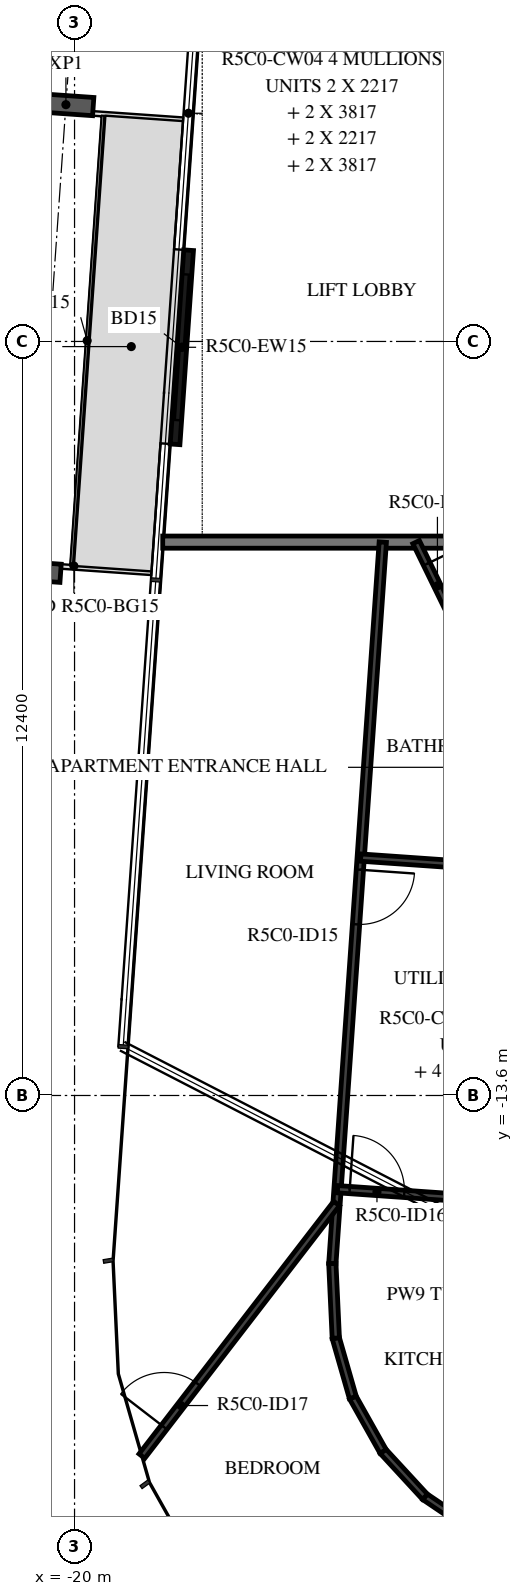
"""IFC4 building model, lengths in metres.
Left out: names, types, materials, properties, quantities, classifications, styles, units other than length and angle.
Written with IfcOpenShell. Run it as: python <this file> out.ifc"""

import sys

from ifc_helpers import new_model, si_unit, direction, frame, frame_2d, origin, origin_2d, place, context, subcontext, project, spatial, rectangle, i_section, extrude, element, fill, save


model = new_model("IFC4")
c1 = context("Model", 3, precision=1e-05, world=origin(), true_north=direction((0.0, 1.0)))
c2 = subcontext(c1, "Body", "Model", "MODEL_VIEW")
j1 = project(units=[si_unit("LENGTHUNIT", "METRE"), si_unit("PLANEANGLEUNIT", "RADIAN")], contexts=[c1])
p1 = place(None, origin())
s1 = spatial("IfcSite", under=j1, at=p1, CompositionType="ELEMENT")
p2 = place(p1, origin())
s2 = spatial("IfcBuilding", under=s1, at=p2, CompositionType="ELEMENT")
p3 = place(p2, frame((0.0, 0.0, 209.4)))
s3 = spatial("IfcBuildingStorey", under=s2, at=p3, CompositionType="ELEMENT", Elevation=209.4)
for number, where, z_axis, x_axis in (
    (1, (-20.142, 2.694, -0.38), (0.0, 0.0, 1.0), (0.07, 0.998, 0.0)),
    (2, (-20.679, -4.981, -0.38), (0.0, 0.0, 1.0), (0.07, 0.998, 0.0)),
):
    element("IfcColumn", number, at=place(p3, frame(where, z_axis=z_axis, x_axis=x_axis)), inside=s3, PredefinedType="COLUMN", context=c2, shape_type="SweptSolid", body=[
        extrude(i_section(OverallWidth=0.3, OverallDepth=0.9, WebThickness=0.019, FlangeThickness=0.035, FilletRadius=0.03, at=origin_2d()), origin(), (0.0, 0.0, 1.0), 3.5),
    ])
p4 = place(p3, frame((-18.124, 0.301, 0.0), z_axis=(0.0, 0.0, 1.0), x_axis=(-0.069728915792, -0.997565976917, 0.0)))
e3 = element("IfcWall", 3, at=p4, inside=s3, PredefinedType="STANDARD", context=c2, shape_type="SweptSolid", body=[
    extrude(rectangle(XDim=3.2, YDim=0.16, at=frame_2d((1.6, 0.0))), origin(), (0.0, 0.0, 1.0), 3.12),
])
p5 = place(p4, frame((0.4, 0.0, 0.0)))
e4 = element("IfcOpeningElement", 4, at=p5, cuts=e3, PredefinedType="OPENING", context=c2, shape_type="SweptSolid", body=[
    extrude(rectangle(XDim=2.4, YDim=2.4, at=frame_2d((1.2, 1.2))), frame((0.0, 0.09, 0.0), z_axis=(0.0, -1.0, 0.0), x_axis=(1.0, 0.0, 0.0)), (0.0, 0.0, 1.0), 0.18),
])
p6 = place(p3, frame((-18.55, -4.5, 0.0), z_axis=(0.0, 0.0, 1.0), x_axis=(1.0, 0.0, 0.0)))
e5 = element("IfcWall", 5, at=p6, inside=s3, PredefinedType="STANDARD", context=c2, shape_type="SweptSolid", body=[
    extrude(rectangle(XDim=7.438, YDim=0.2, at=frame_2d((3.719, 0.0))), origin(), (0.0, 0.0, 1.0), 3.12),
])
p7 = place(p3, frame((-14.979, -24.017, 0.0), z_axis=(0.0, 0.0, 1.0), x_axis=(0.449732900329, 0.89316309729, 0.0)))
e6 = element("IfcWall", 6, at=p7, inside=s3, PredefinedType="STANDARD", context=c2, shape_type="SweptSolid", body=[
    extrude(rectangle(XDim=5.229, YDim=0.2, at=frame_2d((2.615, 0.0))), origin(), (0.0, 0.0, 1.0), 2.73),
])
p8 = place(p3, frame((-14.383, -4.5, 0.0), z_axis=(0.0, 0.0, 1.0), x_axis=(0.438393414895, -0.898783185077, 0.0)))
e7 = element("IfcWall", 7, at=p8, inside=s3, PredefinedType="PARTITIONING", context=c2, shape_type="SweptSolid", body=[
    extrude(rectangle(XDim=6.049, YDim=0.12, at=frame_2d((3.024, 0.0))), origin(), (0.0, 0.0, 1.0), 3.12),
])
p9 = place(p8, frame((0.4, 0.0, 0.0)))
e8 = element("IfcOpeningElement", 8, at=p9, cuts=e7, PredefinedType="OPENING", context=c2, shape_type="SweptSolid", body=[
    extrude(rectangle(XDim=0.8, YDim=2.1, at=frame_2d((0.4, 1.05))), frame((0.0, 0.07, 0.0), z_axis=(0.0, -1.0, 0.0), x_axis=(1.0, 0.0, 0.0)), (0.0, 0.0, 1.0), 0.14),
])
p10 = place(p3, frame((-14.931, -4.5, 0.0), z_axis=(0.0, 0.0, 1.0), x_axis=(-0.069751708439, -0.997564383471, 0.0)))
e9 = element("IfcWall", 9, at=p10, inside=s3, PredefinedType="PARTITIONING", context=c2, shape_type="SweptSolid", body=[
    extrude(rectangle(XDim=11.894, YDim=0.12, at=frame_2d((5.947, 0.0))), origin(), (0.0, 0.0, 1.0), 3.12),
])
p11 = place(p10, frame((5.4, 0.0, 0.0)))
e10 = element("IfcOpeningElement", 10, at=p11, cuts=e9, PredefinedType="OPENING", context=c2, shape_type="SweptSolid", body=[
    extrude(rectangle(XDim=0.9, YDim=2.1, at=frame_2d((0.45, 1.05))), frame((0.0, 0.07, 0.0), z_axis=(0.0, -1.0, 0.0), x_axis=(1.0, 0.0, 0.0)), (0.0, 0.0, 1.0), 0.14),
])
p12 = place(p3, frame((-15.294, -9.688, 0.0), z_axis=(0.0, 0.0, 1.0), x_axis=(0.997565819809, -0.069731163391, 0.0)))
e11 = element("IfcWall", 11, at=p12, inside=s3, PredefinedType="PARTITIONING", context=c2, shape_type="SweptSolid", body=[
    extrude(rectangle(XDim=3.571, YDim=0.12, at=frame_2d((1.786, 0.0))), origin(), (0.0, 0.0, 1.0), 3.12),
])
p13 = place(p3, frame((-18.892, -19.531, 0.0), z_axis=(0.0, 0.0, 1.0), x_axis=(0.610347240441, 0.792133982408, 0.0)))
e12 = element("IfcWall", 12, at=p13, inside=s3, PredefinedType="PARTITIONING", context=c2, shape_type="SweptSolid", body=[
    extrude(rectangle(XDim=5.244, YDim=0.12, at=frame_2d((2.622, 0.0))), origin(), (0.0, 0.0, 1.0), 3.12),
])
p14 = place(p13, frame((0.6, 0.0, 0.0)))
e13 = element("IfcOpeningElement", 13, at=p14, cuts=e12, PredefinedType="OPENING", context=c2, shape_type="SweptSolid", body=[
    extrude(rectangle(XDim=0.9, YDim=2.1, at=frame_2d((0.45, 1.05))), frame((0.0, 0.07, 0.0), z_axis=(0.0, -1.0, 0.0), x_axis=(1.0, 0.0, 0.0)), (0.0, 0.0, 1.0), 0.14),
])
p15 = place(p3, frame((-15.675, -15.141, 0.0), z_axis=(0.0, 0.0, 1.0), x_axis=(0.997563107735, -0.06976995117, 0.0)))
e14 = element("IfcWall", 14, at=p15, inside=s3, PredefinedType="PARTITIONING", context=c2, shape_type="SweptSolid", body=[
    extrude(rectangle(XDim=4.146, YDim=0.12, at=frame_2d((2.073, 0.0))), origin(), (0.0, 0.0, 1.0), 3.12),
])
p16 = place(p15, frame((0.2, 0.0, 0.0)))
e15 = element("IfcOpeningElement", 15, at=p16, cuts=e14, PredefinedType="OPENING", context=c2, shape_type="SweptSolid", body=[
    extrude(rectangle(XDim=0.9, YDim=2.1, at=frame_2d((0.45, 1.05))), frame((0.0, 0.07, 0.0), z_axis=(0.0, -1.0, 0.0), x_axis=(1.0, 0.0, 0.0)), (0.0, 0.0, 1.0), 0.14),
])
for number, where, z_axis, x_axis in (
    (16, (-13.395, -20.767, 0.0), (0.0, 0.0, 1.0), (-0.829, 0.559, 0.0)),
    (17, (-14.237, -20.199, 0.0), (0.0, 0.0, 1.0), (-0.678, 0.735, 0.0)),
):
    element("IfcWall", number, at=place(p3, frame(where, z_axis=z_axis, x_axis=x_axis)), inside=s3, PredefinedType="PARTITIONING", context=c2, shape_type="SweptSolid", body=[
        extrude(rectangle(XDim=1.016, YDim=0.12, at=frame_2d((0.508, 0.0))), origin(), (0.0, 0.0, 1.0), 3.12),
    ])
p17 = place(p3, frame((-14.926, -19.452, 0.0), z_axis=(0.0, 0.0, 1.0), x_axis=(-0.489941776958, 0.871755157823, 0.0)))
e18 = element("IfcWall", 18, at=p17, inside=s3, PredefinedType="PARTITIONING", context=c2, shape_type="SweptSolid", body=[
    extrude(rectangle(XDim=1.016, YDim=0.12, at=frame_2d((0.508, 0.0))), origin(), (0.0, 0.0, 1.0), 3.12),
])
p18 = place(p3, frame((-15.424, -18.567, 0.0), z_axis=(0.0, 0.0, 1.0), x_axis=(-0.275641454312, 0.961260520704, 0.0)))
e19 = element("IfcWall", 19, at=p18, inside=s3, PredefinedType="PARTITIONING", context=c2, shape_type="SweptSolid", body=[
    extrude(rectangle(XDim=1.016, YDim=0.12, at=frame_2d((0.508, 0.0))), origin(), (0.0, 0.0, 1.0), 3.12),
])
p19 = place(p3, frame((-15.704, -17.59, 0.0), z_axis=(0.0, 0.0, 1.0), x_axis=(-0.046364428258, 0.998924591645, 0.0)))
e20 = element("IfcWall", 20, at=p19, inside=s3, PredefinedType="PARTITIONING", context=c2, shape_type="SweptSolid", body=[
    extrude(rectangle(XDim=1.227, YDim=0.12, at=frame_2d((0.613, 0.0))), origin(), (0.0, 0.0, 1.0), 3.12),
])
p20 = place(p5, origin())
e21 = element("IfcDoor", 21, at=p20, inside=s3, OperationType="DOUBLE_DOOR_SLIDING", PredefinedType="DOOR", context=c2, shape_type="SweptSolid", body=[
    extrude(rectangle(XDim=2.4, YDim=2.4, at=frame_2d((1.2, 1.2))), frame((0.0, 0.025, 0.0), z_axis=(0.0, -1.0, 0.0), x_axis=(1.0, 0.0, 0.0)), (0.0, 0.0, 1.0), 0.05),
])
fill(e4, e21)
p21 = place(p9, origin())
e22 = element("IfcDoor", 22, at=p21, inside=s3, OperationType="SINGLE_SWING_RIGHT", PredefinedType="DOOR", context=c2, shape_type="SweptSolid", body=[
    extrude(rectangle(XDim=0.8, YDim=2.1, at=frame_2d((0.4, 1.05))), frame((0.0, 0.025, 0.0), z_axis=(0.0, -1.0, 0.0), x_axis=(1.0, 0.0, 0.0)), (0.0, 0.0, 1.0), 0.05),
])
fill(e8, e22)
p22 = place(p11, origin())
e23 = element("IfcDoor", 23, at=p22, inside=s3, OperationType="SINGLE_SWING_RIGHT", PredefinedType="DOOR", context=c2, shape_type="SweptSolid", body=[
    extrude(rectangle(XDim=0.9, YDim=2.1, at=frame_2d((0.45, 1.05))), frame((0.0, 0.025, 0.0), z_axis=(0.0, -1.0, 0.0), x_axis=(1.0, 0.0, 0.0)), (0.0, 0.0, 1.0), 0.05),
])
fill(e10, e23)
p23 = place(p16, origin())
e24 = element("IfcDoor", 24, at=p23, inside=s3, OperationType="SINGLE_SWING_RIGHT", PredefinedType="DOOR", context=c2, shape_type="SweptSolid", body=[
    extrude(rectangle(XDim=0.9, YDim=2.1, at=frame_2d((0.45, 1.05))), frame((0.0, 0.025, 0.0), z_axis=(0.0, -1.0, 0.0), x_axis=(1.0, 0.0, 0.0)), (0.0, 0.0, 1.0), 0.05),
])
fill(e15, e24)
p24 = place(p14, origin())
e25 = element("IfcDoor", 25, at=p24, inside=s3, OperationType="SINGLE_SWING_RIGHT", PredefinedType="DOOR", context=c2, shape_type="SweptSolid", body=[
    extrude(rectangle(XDim=0.9, YDim=2.1, at=frame_2d((0.45, 1.05))), frame((0.0, 0.025, 0.0), z_axis=(0.0, -1.0, 0.0), x_axis=(1.0, 0.0, 0.0)), (0.0, 0.0, 1.0), 0.05),
])
fill(e13, e25)
save(model, sys.argv[1])
